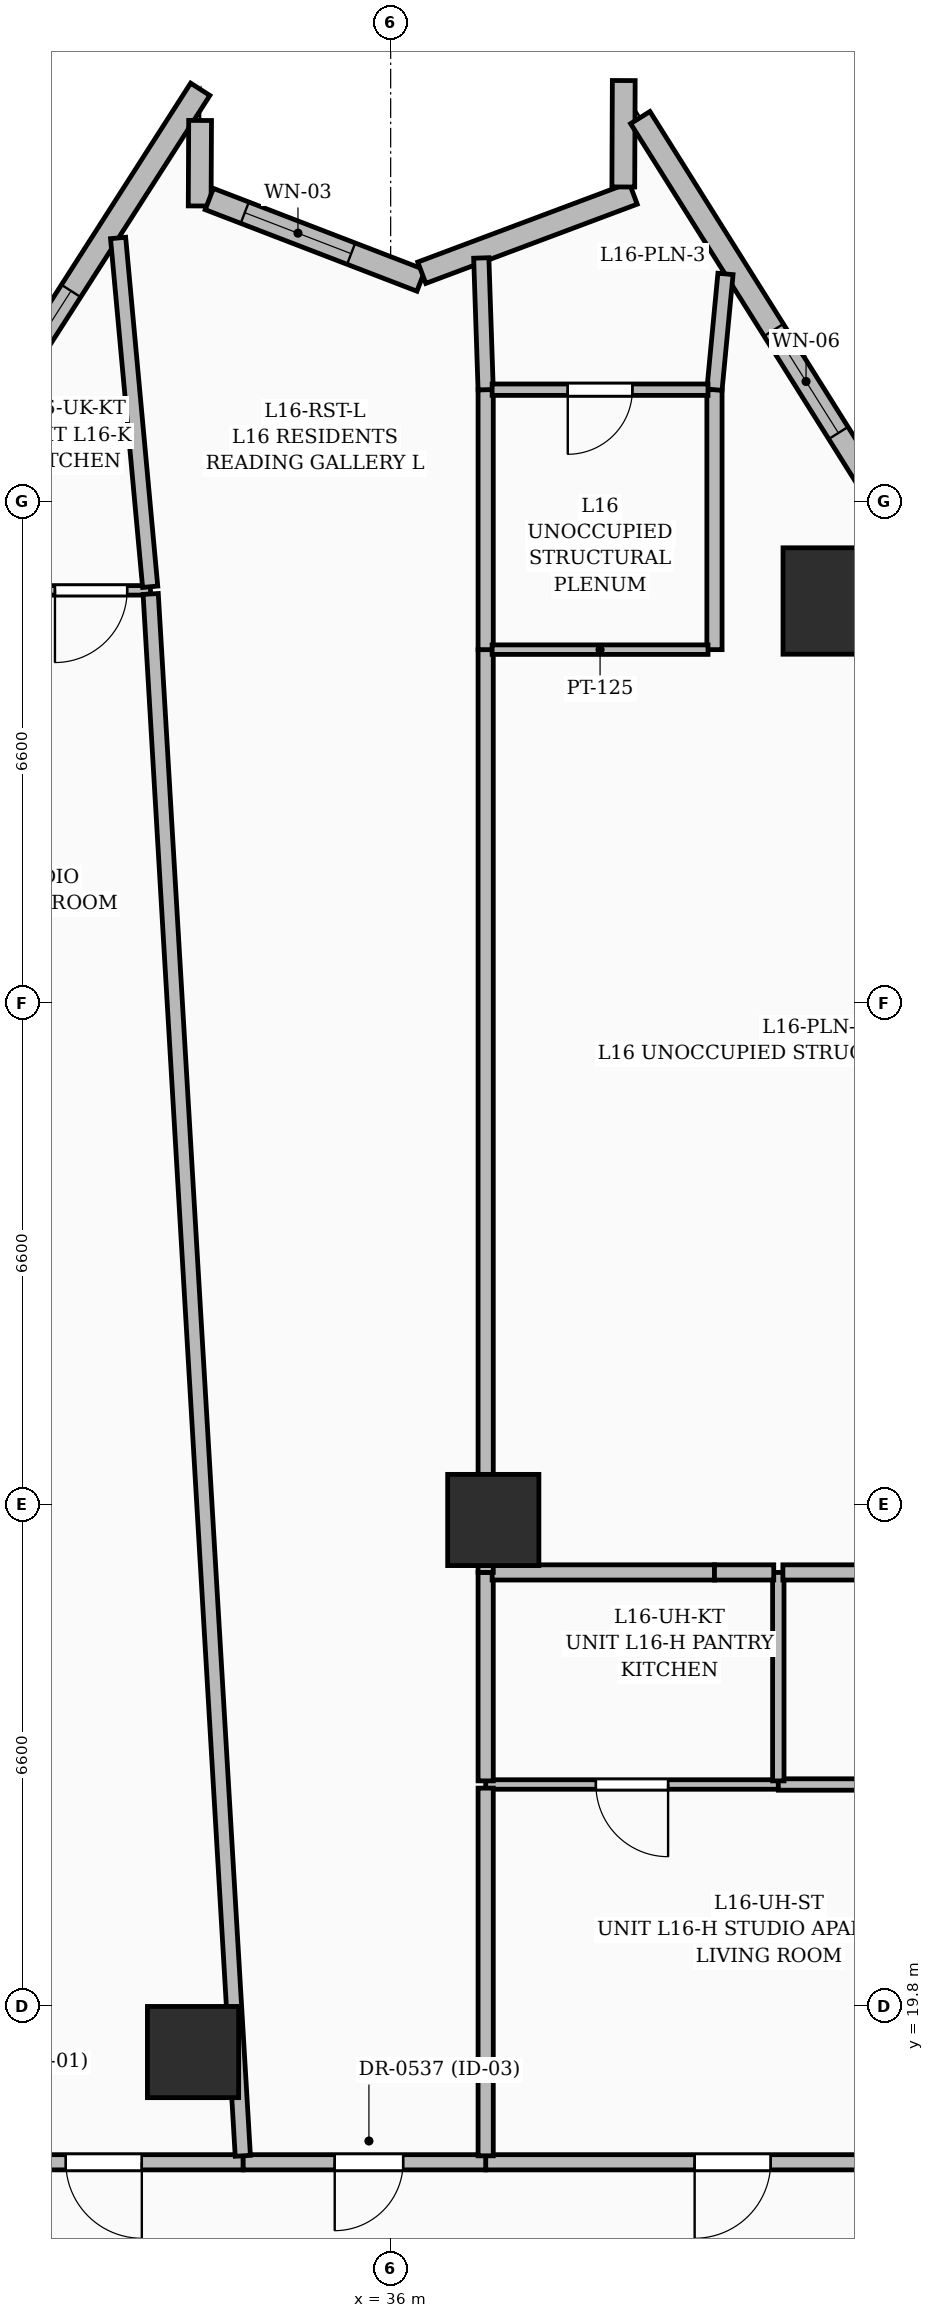
"""IFC4 building model, lengths in metres.
Left out: names, types, materials, properties, quantities, classifications, styles, units other than length and angle.
Written with IfcOpenShell. Run it as: python <this file> out.ifc"""

import sys

from ifc_helpers import new_model, si_unit, direction, frame, frame_2d, origin, origin_2d, place, context, subcontext, project, spatial, rectangle, extrude, element, fill, save


model = new_model("IFC4")
c1 = context("Model", 3, precision=1e-05, world=origin(), true_north=direction((0.0, 1.0)))
c2 = subcontext(c1, "Body", "Model", "MODEL_VIEW")
j1 = project(units=[si_unit("LENGTHUNIT", "METRE"), si_unit("PLANEANGLEUNIT", "RADIAN")], contexts=[c1])
p1 = place(None, origin())
s1 = spatial("IfcSite", under=j1, at=p1, CompositionType="ELEMENT")
p2 = place(p1, origin())
s2 = spatial("IfcBuilding", under=s1, at=p2, CompositionType="ELEMENT")
p3 = place(p2, frame((0.0, 0.0, 67.8)))
s3 = spatial("IfcBuildingStorey", under=s2, at=p3, CompositionType="ELEMENT", Elevation=67.8)
for number, where, z_axis, x_axis in (
    (1, (37.35, 26.2, 0.0), (0.0, 0.0, 1.0), (1.0, 0.0, 0.0)),
    (2, (33.4, 19.2, 0.0), (0.0, 0.0, 1.0), (1.0, 0.0, 0.0)),
):
    element("IfcColumn", number, at=place(p3, frame(where, z_axis=z_axis, x_axis=x_axis)), inside=s3, PredefinedType="COLUMN", context=c2, shape_type="SweptSolid", body=[
        extrude(rectangle(XDim=1.2, YDim=1.2, at=origin_2d()), origin(), (0.0, 0.0, 1.0), 3.6),
    ])
p4 = place(p3, frame((41.862, 38.29, 0.0), z_axis=(0.0, 0.0, 1.0), x_axis=(1.0, 0.0, 0.0)))
e3 = element("IfcColumn", 3, at=p4, inside=s3, PredefinedType="COLUMN", context=c2, shape_type="SweptSolid", body=[
    extrude(rectangle(XDim=1.4, YDim=1.4, at=origin_2d()), origin(), (0.0, 0.0, 1.0), 3.6),
])
p5 = place(p3, frame((30.352, 40.117, 0.0), z_axis=(0.0, 0.0, 1.0), x_axis=(0.539522163193, 0.841971398222, 0.0)))
e4 = element("IfcWall", 4, at=p5, inside=s3, PredefinedType="SOLIDWALL", context=c2, shape_type="SweptSolid", body=[
    extrude(rectangle(XDim=5.826, YDim=0.3, at=frame_2d((2.913, 0.0))), origin(), (0.0, 0.0, 1.0), 3.35),
])
p6 = place(p5, frame((0.875, 0.0, 0.6)))
e5 = element("IfcOpeningElement", 5, at=p6, cuts=e4, PredefinedType="OPENING", context=c2, shape_type="SweptSolid", body=[
    extrude(rectangle(XDim=1.8, YDim=2.1, at=frame_2d((0.9, 1.05))), frame((0.0, 0.16, 0.0), z_axis=(0.0, -1.0, 0.0), x_axis=(1.0, 0.0, 0.0)), (0.0, 0.0, 1.0), 0.32),
])
p7 = place(p3, frame((33.493, 44.612, 0.0), z_axis=(0.0, 0.0, 1.0), x_axis=(-0.004991257271, -0.999987543598, 0.0)))
e6 = element("IfcWall", 6, at=p7, inside=s3, PredefinedType="SOLIDWALL", context=c2, shape_type="SweptSolid", body=[
    extrude(rectangle(XDim=1.125, YDim=0.3, at=frame_2d((0.562, 0.0))), origin(), (0.0, 0.0, 1.0), 3.35),
])
p8 = place(p3, frame((33.614, 43.579, 0.0), z_axis=(0.0, 0.0, 1.0), x_axis=(0.933166321884, -0.359444871576, 0.0)))
e7 = element("IfcWall", 7, at=p8, inside=s3, PredefinedType="SOLIDWALL", context=c2, shape_type="SweptSolid", body=[
    extrude(rectangle(XDim=2.985, YDim=0.3, at=frame_2d((1.493, 0.0))), origin(), (0.0, 0.0, 1.0), 3.35),
])
p9 = place(p8, frame((0.5, 0.0, 0.6)))
e8 = element("IfcOpeningElement", 8, at=p9, cuts=e7, PredefinedType="OPENING", context=c2, shape_type="SweptSolid", body=[
    extrude(rectangle(XDim=1.5, YDim=2.1, at=frame_2d((0.75, 1.05))), frame((0.0, 0.16, 0.0), z_axis=(0.0, -1.0, 0.0), x_axis=(1.0, 0.0, 0.0)), (0.0, 0.0, 1.0), 0.32),
])
p10 = place(p3, frame((36.409, 42.609, 0.0), z_axis=(0.0, 0.0, 1.0), x_axis=(0.936403459864, 0.350925291699, 0.0)))
e9 = element("IfcWall", 9, at=p10, inside=s3, PredefinedType="SOLIDWALL", context=c2, shape_type="SweptSolid", body=[
    extrude(rectangle(XDim=2.971, YDim=0.3, at=frame_2d((1.485, 0.0))), origin(), (0.0, 0.0, 1.0), 3.35),
])
p11 = place(p3, frame((39.061, 43.737, 0.0), z_axis=(0.0, 0.0, 1.0), x_axis=(0.004359916705, 0.999990495518, 0.0)))
e10 = element("IfcWall", 10, at=p11, inside=s3, PredefinedType="SOLIDWALL", context=c2, shape_type="SweptSolid", body=[
    extrude(rectangle(XDim=1.4, YDim=0.3, at=frame_2d((0.7, 0.0))), origin(), (0.0, 0.0, 1.0), 3.35),
])
p12 = place(p3, frame((39.284, 44.65, 0.0), z_axis=(0.0, 0.0, 1.0), x_axis=(0.531922759959, -0.846792877531, 0.0)))
e11 = element("IfcWall", 11, at=p12, inside=s3, PredefinedType="SOLIDWALL", context=c2, shape_type="SweptSolid", body=[
    extrude(rectangle(XDim=5.688, YDim=0.3, at=frame_2d((2.844, 0.0))), origin(), (0.0, 0.0, 1.0), 3.35),
])
p13 = place(p12, frame((3.3, 0.0, 0.55)))
e12 = element("IfcOpeningElement", 12, at=p13, cuts=e11, PredefinedType="OPENING", context=c2, shape_type="SweptSolid", body=[
    extrude(rectangle(XDim=1.6, YDim=2.2, at=frame_2d((0.8, 1.1))), frame((0.0, 0.16, 0.0), z_axis=(0.0, -1.0, 0.0), x_axis=(1.0, 0.0, 0.0)), (0.0, 0.0, 1.0), 0.32),
])
p14 = place(p3, frame((43.63, 17.75, 0.0), z_axis=(0.0, 0.0, 1.0), x_axis=(-1.0, 0.0, 0.0)))
e13 = element("IfcWall", 13, at=p14, inside=s3, PredefinedType="PARTITIONING", context=c2, shape_type="SweptSolid", body=[
    extrude(rectangle(XDim=6.38, YDim=0.2, at=frame_2d((3.19, 0.0))), origin(), (0.0, 0.0, 1.0), 3.35),
])
p15 = place(p14, frame((2.631, 0.0, 0.0)))
e14 = element("IfcOpeningElement", 14, at=p15, cuts=e13, PredefinedType="OPENING", context=c2, shape_type="SweptSolid", body=[
    extrude(rectangle(XDim=1.0, YDim=2.2, at=frame_2d((0.5, 1.1))), frame((0.0, 0.11, 0.0), z_axis=(0.0, -1.0, 0.0), x_axis=(1.0, 0.0, 0.0)), (0.0, 0.0, 1.0), 0.22),
])
p16 = place(p3, frame((34.06, 17.75, 0.0), z_axis=(0.0, 0.0, 1.0), x_axis=(-1.0, 0.0, 0.0)))
e15 = element("IfcWall", 15, at=p16, inside=s3, PredefinedType="PARTITIONING", context=c2, shape_type="SweptSolid", body=[
    extrude(rectangle(XDim=3.19, YDim=0.2, at=frame_2d((1.595, 0.0))), origin(), (0.0, 0.0, 1.0), 2.309),
])
p17 = place(p16, frame((1.334, 0.0, 0.0)))
e16 = element("IfcOpeningElement", 16, at=p17, cuts=e15, PredefinedType="OPENING", context=c2, shape_type="SweptSolid", body=[
    extrude(rectangle(XDim=1.0, YDim=2.2, at=frame_2d((0.5, 1.1))), frame((0.0, 0.11, 0.0), z_axis=(0.0, -1.0, 0.0), x_axis=(1.0, 0.0, 0.0)), (0.0, 0.0, 1.0), 0.22),
])
p18 = place(p3, frame((37.25, 17.75, 0.0), z_axis=(0.0, 0.0, 1.0), x_axis=(-1.0, 0.0, 0.0)))
e17 = element("IfcWall", 17, at=p18, inside=s3, PredefinedType="PARTITIONING", context=c2, shape_type="SweptSolid", body=[
    extrude(rectangle(XDim=3.19, YDim=0.2, at=frame_2d((1.595, 0.0))), origin(), (0.0, 0.0, 1.0), 2.309),
])
p19 = place(p18, frame((1.086, 0.0, 0.0)))
e18 = element("IfcOpeningElement", 18, at=p19, cuts=e17, PredefinedType="OPENING", context=c2, shape_type="SweptSolid", body=[
    extrude(rectangle(XDim=0.9, YDim=2.1, at=frame_2d((0.45, 1.05))), frame((0.0, 0.11, 0.0), z_axis=(0.0, -1.0, 0.0), x_axis=(1.0, 0.0, 0.0)), (0.0, 0.0, 1.0), 0.22),
])
p20 = place(p3, frame((41.1, 22.72, 0.0), z_axis=(0.0, 0.0, 1.0), x_axis=(-1.0, 0.0, 0.0)))
e19 = element("IfcWall", 19, at=p20, inside=s3, PredefinedType="PARTITIONING", context=c2, shape_type="SweptSolid", body=[
    extrude(rectangle(XDim=3.85, YDim=0.125, at=frame_2d((1.925, 0.0))), origin(), (0.0, 0.0, 1.0), 3.35),
])
p21 = place(p20, frame((1.45, 0.0, 0.0)))
e20 = element("IfcOpeningElement", 20, at=p21, cuts=e19, PredefinedType="OPENING", context=c2, shape_type="SweptSolid", body=[
    extrude(rectangle(XDim=0.95, YDim=2.2, at=frame_2d((0.475, 1.1))), frame((0.0, 0.072, 0.0), z_axis=(0.0, -1.0, 0.0), x_axis=(1.0, 0.0, 0.0)), (0.0, 0.0, 1.0), 0.145),
])
p22 = place(p3, frame((44.48, 22.72, 0.0), z_axis=(0.0, 0.0, 1.0), x_axis=(-1.0, 0.0, 0.0)))
e21 = element("IfcWall", 21, at=p22, inside=s3, PredefinedType="PARTITIONING", context=c2, shape_type="SweptSolid", body=[
    extrude(rectangle(XDim=3.38, YDim=0.15, at=frame_2d((1.69, 0.0))), origin(), (0.0, 0.0, 1.0), 2.309),
])
p23 = place(p22, frame((1.206, 0.0, 0.0)))
e22 = element("IfcOpeningElement", 22, at=p23, cuts=e21, PredefinedType="OPENING", context=c2, shape_type="SweptSolid", body=[
    extrude(rectangle(XDim=0.85, YDim=2.1, at=frame_2d((0.425, 1.05))), frame((0.0, 0.085, 0.0), z_axis=(0.0, -1.0, 0.0), x_axis=(1.0, 0.0, 0.0)), (0.0, 0.0, 1.0), 0.17),
])
p24 = place(p3, frame((37.25, 22.673, 0.0), z_axis=(0.0, 0.0, 1.0), x_axis=(0.0, -1.0, 0.0)))
e23 = element("IfcWall", 23, at=p24, inside=s3, PredefinedType="PARTITIONING", context=c2, shape_type="SweptSolid", body=[
    extrude(rectangle(XDim=4.838, YDim=0.2, at=frame_2d((2.419, 0.0))), origin(), (0.0, 0.0, 1.0), 3.35),
])
p25 = place(p3, frame((41.1, 22.768, 0.0), z_axis=(0.0, 0.0, 1.0), x_axis=(0.0, 1.0, 0.0)))
e24 = element("IfcWall", 24, at=p25, inside=s3, PredefinedType="PARTITIONING", context=c2, shape_type="SweptSolid", body=[
    extrude(rectangle(XDim=2.742, YDim=0.15, at=frame_2d((1.371, 0.0))), origin(), (0.0, 0.0, 1.0), 3.35),
])
p26 = place(p3, frame((37.25, 25.51, 0.0), z_axis=(0.0, 0.0, 1.0), x_axis=(0.0, -1.0, 0.0)))
e25 = element("IfcWall", 25, at=p26, inside=s3, PredefinedType="PARTITIONING", context=c2, shape_type="SweptSolid", body=[
    extrude(rectangle(XDim=2.742, YDim=0.2, at=frame_2d((1.371, 0.0))), origin(), (0.0, 0.0, 1.0), 2.309),
])
p27 = place(p3, frame((40.26, 25.51, 0.0), z_axis=(0.0, 0.0, 1.0), x_axis=(-1.0, 0.0, 0.0)))
e26 = element("IfcWall", 26, at=p27, inside=s3, PredefinedType="PARTITIONING", context=c2, shape_type="SweptSolid", body=[
    extrude(rectangle(XDim=2.925, YDim=0.2, at=frame_2d((1.462, 0.0))), origin(), (0.0, 0.0, 1.0), 3.35),
])
p28 = place(p3, frame((43.14, 25.51, 0.0), z_axis=(0.0, 0.0, 1.0), x_axis=(-1.0, 0.0, 0.0)))
e27 = element("IfcWall", 27, at=p28, inside=s3, PredefinedType="PARTITIONING", context=c2, shape_type="SweptSolid", body=[
    extrude(rectangle(XDim=1.98, YDim=0.2, at=frame_2d((0.99, 0.0))), origin(), (0.0, 0.0, 1.0), 2.309),
])
p29 = place(p3, frame((32.84, 38.43, 0.0), z_axis=(0.0, 0.0, 1.0), x_axis=(-1.0, 0.0, 0.0)))
e28 = element("IfcWall", 28, at=p29, inside=s3, PredefinedType="PARTITIONING", context=c2, shape_type="SweptSolid", body=[
    extrude(rectangle(XDim=1.48, YDim=0.125, at=frame_2d((0.74, 0.0))), origin(), (0.0, 0.0, 1.0), 2.37),
])
p30 = place(p29, frame((0.307, 0.0, 0.0)))
e29 = element("IfcOpeningElement", 29, at=p30, cuts=e28, PredefinedType="OPENING", context=c2, shape_type="SweptSolid", body=[
    extrude(rectangle(XDim=0.95, YDim=2.2, at=frame_2d((0.475, 1.1))), frame((0.0, 0.072, 0.0), z_axis=(0.0, -1.0, 0.0), x_axis=(1.0, 0.0, 0.0)), (0.0, 0.0, 1.0), 0.145),
])
p31 = place(p3, frame((34.055, 17.835, 0.0), z_axis=(0.0, 0.0, 1.0), x_axis=(-0.058890284917, 0.998264461124, 0.0)))
e30 = element("IfcWall", 30, at=p31, inside=s3, PredefinedType="PARTITIONING", context=c2, shape_type="SweptSolid", body=[
    extrude(rectangle(XDim=20.583, YDim=0.2, at=frame_2d((10.292, 0.0))), origin(), (0.0, 0.0, 1.0), 2.279),
])
p32 = place(p3, frame((32.836, 38.477, 0.0), z_axis=(0.0, 0.0, 1.0), x_axis=(-0.091605755033, 0.995795353295, 0.0)))
e31 = element("IfcWall", 31, at=p32, inside=s3, PredefinedType="PARTITIONING", context=c2, shape_type="SweptSolid", body=[
    extrude(rectangle(XDim=4.608, YDim=0.2, at=frame_2d((2.304, 0.0))), origin(), (0.0, 0.0, 1.0), 2.37),
])
p33 = place(p3, frame((37.25, 25.51, 0.0), z_axis=(0.0, 0.0, 1.0), x_axis=(0.0, 1.0, 0.0)))
e32 = element("IfcWall", 32, at=p33, inside=s3, PredefinedType="PARTITIONING", context=c2, shape_type="SweptSolid", body=[
    extrude(rectangle(XDim=12.14, YDim=0.2, at=frame_2d((6.07, 0.0))), origin(), (0.0, 0.0, 1.0), 2.279),
])
p34 = place(p3, frame((37.25, 37.65, 0.0), z_axis=(0.0, 0.0, 1.0), x_axis=(0.0, 1.0, 0.0)))
e33 = element("IfcWall", 33, at=p34, inside=s3, PredefinedType="PARTITIONING", context=c2, shape_type="SweptSolid", body=[
    extrude(rectangle(XDim=3.42, YDim=0.2, at=frame_2d((1.71, 0.0))), origin(), (0.0, 0.0, 1.0), 2.37),
])
p35 = place(p3, frame((37.25, 41.07, 0.0), z_axis=(0.0, 0.0, 1.0), x_axis=(-0.033511738673, 0.999438323946, 0.0)))
e34 = element("IfcWall", 34, at=p35, inside=s3, PredefinedType="PARTITIONING", context=c2, shape_type="SweptSolid", body=[
    extrude(rectangle(XDim=1.734, YDim=0.2, at=frame_2d((0.867, 0.0))), origin(), (0.0, 0.0, 1.0), 3.35),
])
p36 = place(p3, frame((40.26, 41.07, 0.0), z_axis=(0.0, 0.0, 1.0), x_axis=(0.0, -1.0, 0.0)))
e35 = element("IfcWall", 35, at=p36, inside=s3, PredefinedType="PARTITIONING", context=c2, shape_type="SweptSolid", body=[
    extrude(rectangle(XDim=3.42, YDim=0.2, at=frame_2d((1.71, 0.0))), origin(), (0.0, 0.0, 1.0), 2.37),
])
p37 = place(p3, frame((40.405, 42.593, 0.0), z_axis=(0.0, 0.0, 1.0), x_axis=(-0.094794030576, -0.99549690696, 0.0)))
e36 = element("IfcWall", 36, at=p37, inside=s3, PredefinedType="PARTITIONING", context=c2, shape_type="SweptSolid", body=[
    extrude(rectangle(XDim=1.53, YDim=0.2, at=frame_2d((0.765, 0.0))), origin(), (0.0, 0.0, 1.0), 3.35),
])
p38 = place(p3, frame((40.175, 37.65, 0.0), z_axis=(0.0, 0.0, 1.0), x_axis=(-1.0, 0.0, 0.0)))
e37 = element("IfcWall", 37, at=p38, inside=s3, PredefinedType="PARTITIONING", context=c2, shape_type="SweptSolid", body=[
    extrude(rectangle(XDim=2.84, YDim=0.125, at=frame_2d((1.42, 0.0))), origin(), (0.0, 0.0, 1.0), 3.35),
])
p39 = place(p3, frame((40.175, 41.07, 0.0), z_axis=(0.0, 0.0, 1.0), x_axis=(-1.0, 0.0, 0.0)))
e38 = element("IfcWall", 38, at=p39, inside=s3, PredefinedType="PARTITIONING", context=c2, shape_type="SweptSolid", body=[
    extrude(rectangle(XDim=2.84, YDim=0.15, at=frame_2d((1.42, 0.0))), origin(), (0.0, 0.0, 1.0), 3.35),
])
p40 = place(p39, frame((0.995, 0.0, 0.0)))
e39 = element("IfcOpeningElement", 39, at=p40, cuts=e38, PredefinedType="OPENING", context=c2, shape_type="SweptSolid", body=[
    extrude(rectangle(XDim=0.85, YDim=2.1, at=frame_2d((0.425, 1.05))), frame((0.0, 0.085, 0.0), z_axis=(0.0, -1.0, 0.0), x_axis=(1.0, 0.0, 0.0)), (0.0, 0.0, 1.0), 0.17),
])
p41 = place(p3, frame((41.04, 25.51, 0.0), z_axis=(0.0, 0.0, 1.0), x_axis=(-1.0, 0.0, 0.0)))
e40 = element("IfcWall", 40, at=p41, inside=s3, PredefinedType="PARTITIONING", context=c2, shape_type="SweptSolid", body=[
    extrude(rectangle(XDim=0.78, YDim=0.2, at=frame_2d((0.39, 0.0))), origin(), (0.0, 0.0, 1.0), 3.35),
])
p42 = place(p6, origin())
e41 = element("IfcWindow", 41, at=p42, inside=s3, PartitioningType="SINGLE_PANEL", PredefinedType="WINDOW", context=c2, shape_type="SweptSolid", body=[
    extrude(rectangle(XDim=1.8, YDim=2.1, at=frame_2d((0.9, 1.05))), frame((0.0, 0.03, 0.0), z_axis=(0.0, -1.0, 0.0), x_axis=(1.0, 0.0, 0.0)), (0.0, 0.0, 1.0), 0.06),
])
fill(e5, e41)
p43 = place(p9, origin())
e42 = element("IfcWindow", 42, at=p43, inside=s3, PartitioningType="SINGLE_PANEL", PredefinedType="WINDOW", context=c2, shape_type="SweptSolid", body=[
    extrude(rectangle(XDim=1.5, YDim=2.1, at=frame_2d((0.75, 1.05))), frame((0.0, 0.03, 0.0), z_axis=(0.0, -1.0, 0.0), x_axis=(1.0, 0.0, 0.0)), (0.0, 0.0, 1.0), 0.06),
])
fill(e8, e42)
p44 = place(p13, origin())
e43 = element("IfcWindow", 43, at=p44, inside=s3, PartitioningType="SINGLE_PANEL", PredefinedType="WINDOW", context=c2, shape_type="SweptSolid", body=[
    extrude(rectangle(XDim=1.6, YDim=2.2, at=frame_2d((0.8, 1.1))), frame((0.0, 0.03, 0.0), z_axis=(0.0, -1.0, 0.0), x_axis=(1.0, 0.0, 0.0)), (0.0, 0.0, 1.0), 0.06),
])
fill(e12, e43)
p45 = place(p19, origin())
e44 = element("IfcDoor", 44, at=p45, inside=s3, OperationType="SINGLE_SWING_RIGHT", PredefinedType="DOOR", context=c2, shape_type="SweptSolid", body=[
    extrude(rectangle(XDim=0.9, YDim=2.1, at=frame_2d((0.45, 1.05))), frame((0.0, 0.025, 0.0), z_axis=(0.0, -1.0, 0.0), x_axis=(1.0, 0.0, 0.0)), (0.0, 0.0, 1.0), 0.05),
])
fill(e18, e44)
p46 = place(p15, origin())
e45 = element("IfcDoor", 45, at=p46, inside=s3, OperationType="SINGLE_SWING_RIGHT", PredefinedType="DOOR", context=c2, shape_type="SweptSolid", body=[
    extrude(rectangle(XDim=1.0, YDim=2.2, at=frame_2d((0.5, 1.1))), frame((0.0, 0.025, 0.0), z_axis=(0.0, -1.0, 0.0), x_axis=(1.0, 0.0, 0.0)), (0.0, 0.0, 1.0), 0.05),
])
fill(e14, e45)
p47 = place(p21, origin())
e46 = element("IfcDoor", 46, at=p47, inside=s3, OperationType="SINGLE_SWING_LEFT", PredefinedType="DOOR", context=c2, shape_type="SweptSolid", body=[
    extrude(rectangle(XDim=0.95, YDim=2.2, at=frame_2d((0.475, 1.1))), frame((0.0, 0.025, 0.0), z_axis=(0.0, -1.0, 0.0), x_axis=(1.0, 0.0, 0.0)), (0.0, 0.0, 1.0), 0.05),
])
fill(e20, e46)
p48 = place(p17, origin())
e47 = element("IfcDoor", 47, at=p48, inside=s3, OperationType="SINGLE_SWING_LEFT", PredefinedType="DOOR", context=c2, shape_type="SweptSolid", body=[
    extrude(rectangle(XDim=1.0, YDim=2.2, at=frame_2d((0.5, 1.1))), frame((0.0, 0.025, 0.0), z_axis=(0.0, -1.0, 0.0), x_axis=(1.0, 0.0, 0.0)), (0.0, 0.0, 1.0), 0.05),
])
fill(e16, e47)
p49 = place(p30, origin())
e48 = element("IfcDoor", 48, at=p49, inside=s3, OperationType="SINGLE_SWING_RIGHT", PredefinedType="DOOR", context=c2, shape_type="SweptSolid", body=[
    extrude(rectangle(XDim=0.95, YDim=2.2, at=frame_2d((0.475, 1.1))), frame((0.0, 0.025, 0.0), z_axis=(0.0, -1.0, 0.0), x_axis=(1.0, 0.0, 0.0)), (0.0, 0.0, 1.0), 0.05),
])
fill(e29, e48)
p50 = place(p40, origin())
e49 = element("IfcDoor", 49, at=p50, inside=s3, OperationType="SINGLE_SWING_RIGHT", PredefinedType="DOOR", context=c2, shape_type="SweptSolid", body=[
    extrude(rectangle(XDim=0.85, YDim=2.1, at=frame_2d((0.425, 1.05))), frame((0.0, 0.025, 0.0), z_axis=(0.0, -1.0, 0.0), x_axis=(1.0, 0.0, 0.0)), (0.0, 0.0, 1.0), 0.05),
])
fill(e39, e49)
save(model, sys.argv[1])
